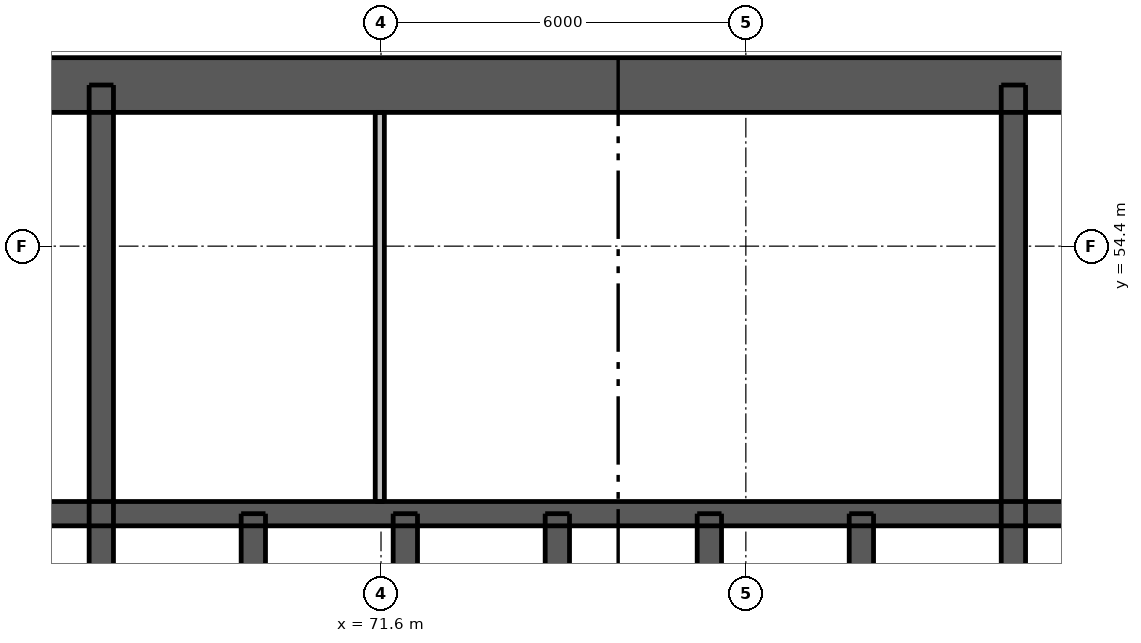
"""IFC4 building model, lengths in metres.
Left out: names, types, materials, properties, quantities, classifications, styles, units other than length and angle.
Written with IfcOpenShell. Run it as: python <this file> out.ifc"""

import sys

from ifc_helpers import new_model, si_unit, direction, frame, frame_2d, origin, place, context, subcontext, project, spatial, rectangle, extrude, element, fill, save


model = new_model("IFC4")
c1 = context("Model", 3, precision=1e-05, world=origin(), true_north=direction((0.0, 1.0)))
c2 = subcontext(c1, "Body", "Model", "MODEL_VIEW")
j1 = project(units=[si_unit("LENGTHUNIT", "METRE"), si_unit("PLANEANGLEUNIT", "RADIAN")], contexts=[c1])
p1 = place(None, origin())
s1 = spatial("IfcSite", under=j1, at=p1, CompositionType="ELEMENT")
p2 = place(p1, origin())
s2 = spatial("IfcBuilding", under=s1, at=p2, CompositionType="ELEMENT")
p3 = place(p2, frame((0.0, 0.0, 66.4)))
s3 = spatial("IfcBuildingStorey", under=s2, at=p3, CompositionType="ELEMENT", Elevation=66.4)
p4 = place(p3, frame((62.5, 57.05, 0.0), z_axis=(0.0, 0.0, 1.0), x_axis=(1.0, 0.0, 0.0)))
e1 = element("IfcWall", 1, at=p4, inside=s3, PredefinedType="SHEAR", context=c2, shape_type="SweptSolid", body=[
    extrude(rectangle(XDim=24.0, YDim=0.9, at=frame_2d((12.0, 0.0))), origin(), (0.0, 0.0, 1.0), 2.95),
])
p5 = place(p4, frame((20.85, 0.0, 0.0)))
e2 = element("IfcOpeningElement", 2, at=p5, cuts=e1, PredefinedType="OPENING", context=c2, shape_type="SweptSolid", body=[
    extrude(rectangle(XDim=1.1, YDim=2.1, at=frame_2d((0.55, 1.05))), frame((0.0, 0.46, 0.0), z_axis=(0.0, -1.0, 0.0), x_axis=(1.0, 0.0, 0.0)), (0.0, 0.0, 1.0), 0.92),
])
p6 = place(p4, frame((2.05, 0.0, 0.0)))
e3 = element("IfcOpeningElement", 3, at=p6, cuts=e1, PredefinedType="OPENING", context=c2, shape_type="SweptSolid", body=[
    extrude(rectangle(XDim=1.1, YDim=2.1, at=frame_2d((0.55, 1.05))), frame((0.0, 0.46, 0.0), z_axis=(0.0, -1.0, 0.0), x_axis=(1.0, 0.0, 0.0)), (0.0, 0.0, 1.0), 0.92),
])
p7 = place(p4, frame((6.44, 0.0, 0.0)))
e4 = element("IfcOpeningElement", 4, at=p7, cuts=e1, PredefinedType="OPENING", context=c2, shape_type="SweptSolid", body=[
    extrude(rectangle(XDim=0.9, YDim=2.1, at=frame_2d((0.45, 1.05))), frame((0.0, 0.46, 0.0), z_axis=(0.0, -1.0, 0.0), x_axis=(1.0, 0.0, 0.0)), (0.0, 0.0, 1.0), 0.92),
])
p8 = place(p4, frame((13.74, 0.0, 0.0)))
e5 = element("IfcOpeningElement", 5, at=p8, cuts=e1, PredefinedType="OPENING", context=c2, shape_type="SweptSolid", body=[
    extrude(rectangle(XDim=0.9, YDim=2.1, at=frame_2d((0.45, 1.05))), frame((0.0, 0.46, 0.0), z_axis=(0.0, -1.0, 0.0), x_axis=(1.0, 0.0, 0.0)), (0.0, 0.0, 1.0), 0.92),
])
p9 = place(p3, frame((62.95, 50.0, 0.0), z_axis=(0.0, 0.0, 1.0), x_axis=(1.0, 0.0, 0.0)))
e6 = element("IfcWall", 6, at=p9, inside=s3, PredefinedType="SHEAR", context=c2, shape_type="SweptSolid", body=[
    extrude(rectangle(XDim=23.1, YDim=0.4, at=frame_2d((11.55, 0.0))), origin(), (0.0, 0.0, 1.0), 2.95),
])
for number, where, z_axis, x_axis in (
    (7, (67.0, 47.1, 0.0), (0.0, 0.0, 1.0), (0.0, 1.0, 0.0)),
    (8, (82.0, 47.1, 0.0), (0.0, 0.0, 1.0), (0.0, 1.0, 0.0)),
):
    element("IfcWall", number, at=place(p3, frame(where, z_axis=z_axis, x_axis=x_axis)), inside=s3, PredefinedType="SHEAR", context=c2, shape_type="SweptSolid", body=[
        extrude(rectangle(XDim=9.95, YDim=0.4, at=frame_2d((4.975, 0.0))), origin(), (0.0, 0.0, 1.0), 2.95),
    ])
for number, where, z_axis, x_axis in (
    (9, (69.5, 47.1, 0.0), (0.0, 0.0, 1.0), (0.0, 1.0, 0.0)),
    (10, (72.0, 47.1, 0.0), (0.0, 0.0, 1.0), (0.0, 1.0, 0.0)),
    (11, (74.5, 47.1, 0.0), (0.0, 0.0, 1.0), (0.0, 1.0, 0.0)),
    (12, (77.0, 47.1, 0.0), (0.0, 0.0, 1.0), (0.0, 1.0, 0.0)),
    (13, (79.5, 47.1, 0.0), (0.0, 0.0, 1.0), (0.0, 1.0, 0.0)),
):
    element("IfcWall", number, at=place(p3, frame(where, z_axis=z_axis, x_axis=x_axis)), inside=s3, PredefinedType="SHEAR", context=c2, shape_type="SweptSolid", body=[
        extrude(rectangle(XDim=2.9, YDim=0.4, at=frame_2d((1.45, 0.0))), origin(), (0.0, 0.0, 1.0), 2.95),
    ])
p10 = place(p3, frame((71.58, 50.2, 0.0), z_axis=(0.0, 0.0, 1.0), x_axis=(0.0, 1.0, 0.0)))
e14 = element("IfcWall", 14, at=p10, inside=s3, PredefinedType="PLUMBINGWALL", context=c2, shape_type="SweptSolid", body=[
    extrude(rectangle(XDim=6.4, YDim=0.15, at=frame_2d((3.2, 0.0))), origin(), (0.0, 0.0, 1.0), 2.95),
])
p11 = place(p7, origin())
e15 = element("IfcDoor", 15, at=p11, inside=s3, OperationType="SINGLE_SWING_RIGHT", PredefinedType="DOOR", context=c2, shape_type="SweptSolid", body=[
    extrude(rectangle(XDim=0.9, YDim=2.1, at=frame_2d((0.45, 1.05))), frame((0.0, -0.388, 0.0), z_axis=(0.0, -1.0, 0.0), x_axis=(1.0, 0.0, 0.0)), (0.0, 0.0, 1.0), 0.05),
])
fill(e4, e15)
p12 = place(p8, origin())
e16 = element("IfcDoor", 16, at=p12, inside=s3, OperationType="SINGLE_SWING_RIGHT", PredefinedType="DOOR", context=c2, shape_type="SweptSolid", body=[
    extrude(rectangle(XDim=0.9, YDim=2.1, at=frame_2d((0.45, 1.05))), frame((0.0, -0.388, 0.0), z_axis=(0.0, -1.0, 0.0), x_axis=(1.0, 0.0, 0.0)), (0.0, 0.0, 1.0), 0.05),
])
fill(e5, e16)
save(model, sys.argv[1])
